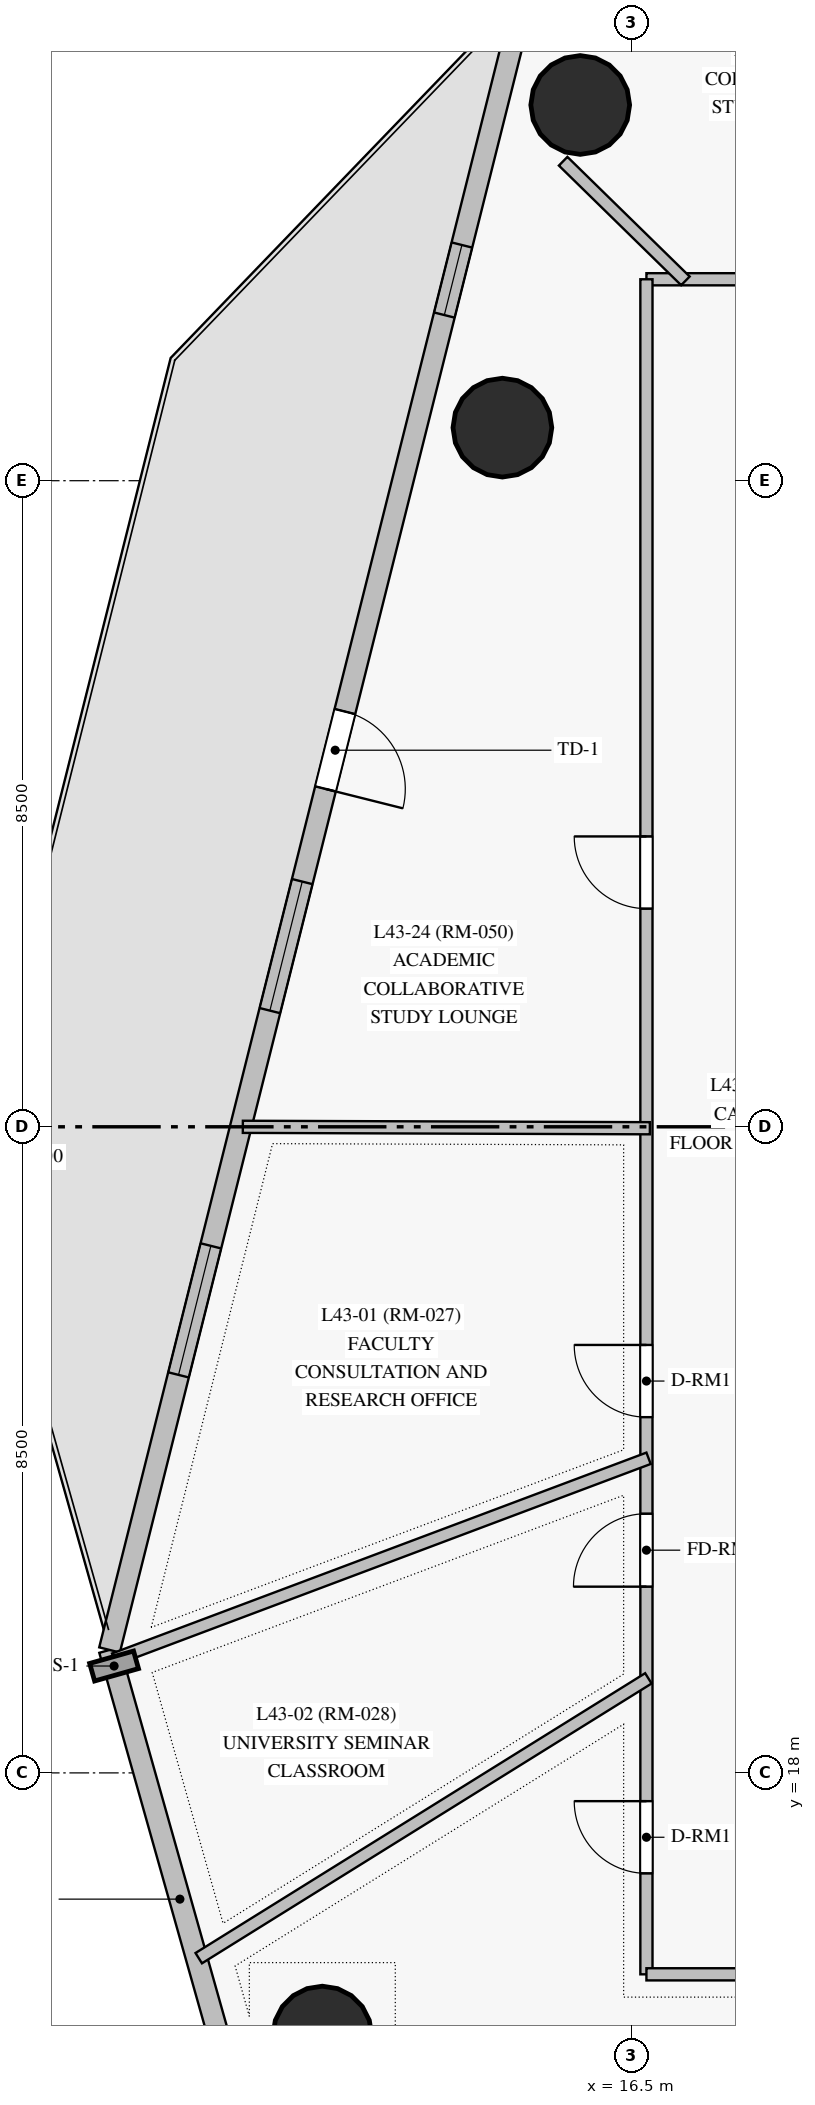
"""IFC4 building model, lengths in metres.
Left out: names, types, materials, properties, quantities, classifications, styles, units other than length and angle.
Written with IfcOpenShell. Run it as: python <this file> out.ifc"""

import sys

from ifc_helpers import new_model, si_unit, direction, frame, frame_2d, origin, origin_with_axes, origin_2d, place, context, subcontext, project, spatial, rectangle, circle, extrude, source, transform, mapped, element, fill, save


model = new_model("IFC4")
c1 = context("Model", 3, precision=1e-05, world=origin(), true_north=direction((0.0, 1.0)))
c2 = subcontext(c1, "Body", "Model", "MODEL_VIEW")
j1 = project(units=[si_unit("LENGTHUNIT", "METRE"), si_unit("PLANEANGLEUNIT", "RADIAN")], contexts=[c1])
p1 = place(None, origin())
s1 = spatial("IfcSite", under=j1, at=p1, CompositionType="ELEMENT")
p2 = place(p1, origin())
s2 = spatial("IfcBuilding", under=s1, at=p2, CompositionType="ELEMENT")
p3 = place(p2, frame((0.0, 0.0, 152.55)))
s3 = spatial("IfcBuildingStorey", under=s2, at=p3, CompositionType="ELEMENT", Elevation=152.55)
m1 = source(origin_with_axes(), c2, "Body", "SweptSolid", [
    extrude(circle(Radius=0.65, at=origin_2d()), origin(), (0.0, 0.0, 1.0), 4.0),
])
for number, where, z_axis, x_axis in (
    (1, (15.829, 39.943, 0.0), (0.0, 0.0, 1.0), (1.0, 0.0, 0.0)),
    (2, (14.805, 35.698, 0.0), (0.0, 0.0, 1.0), (1.0, 0.0, 0.0)),
    (3, (12.436, 14.544, 0.0), (0.0, 0.0, 1.0), (1.0, 0.0, 0.0)),
):
    element("IfcColumn", number, at=place(p3, frame(where, z_axis=z_axis, x_axis=x_axis)), inside=s3, PredefinedType="COLUMN", context=c2, shape_type="MappedRepresentation", body=[
        mapped(m1, transform((0.0, 0.0, 0.0), scale=1.0)),
    ])
p4 = place(p3, frame((9.637, 19.618, 0.0), z_axis=(0.0, 0.0, 1.0), x_axis=(0.271681437249, -0.96238723841, 0.0)))
e4 = element("IfcWall", 4, at=p4, inside=s3, PredefinedType="SOLIDWALL", context=c2, shape_type="SweptSolid", body=[
    extrude(rectangle(XDim=6.813, YDim=0.28, at=frame_2d((3.407, 0.0))), origin(), (0.0, 0.0, 1.0), 3.445),
])
p5 = place(p3, frame((15.117, 41.47, 0.0), z_axis=(0.0, 0.0, 1.0), x_axis=(-0.243272448764, -0.96995799686, 0.0)))
e5 = element("IfcWall", 5, at=p5, inside=s3, PredefinedType="SOLIDWALL", context=c2, shape_type="SweptSolid", body=[
    extrude(rectangle(XDim=22.529, YDim=0.28, at=frame_2d((11.265, 0.0))), origin(), (0.0, 0.0, 1.0), 3.445),
])
p6 = place(p5, frame((3.473, 0.0, 0.85)))
e6 = element("IfcOpeningElement", 6, at=p6, cuts=e5, PredefinedType="OPENING", context=c2, shape_type="SweptSolid", body=[
    extrude(rectangle(XDim=0.95, YDim=1.5, at=frame_2d((0.475, 0.75))), frame((0.0, 0.15, 0.0), z_axis=(0.0, -1.0, 0.0), x_axis=(1.0, 0.0, 0.0)), (0.0, 0.0, 1.0), 0.3),
])
p7 = place(p5, frame((12.108, 0.0, 0.85)))
e7 = element("IfcOpeningElement", 7, at=p7, cuts=e5, PredefinedType="OPENING", context=c2, shape_type="SweptSolid", body=[
    extrude(rectangle(XDim=1.75, YDim=1.65, at=frame_2d((0.875, 0.825))), frame((0.0, 0.15, 0.0), z_axis=(0.0, -1.0, 0.0), x_axis=(1.0, 0.0, 0.0)), (0.0, 0.0, 1.0), 0.3),
])
p8 = place(p5, frame((17.049, 0.0, 0.85)))
e8 = element("IfcOpeningElement", 8, at=p8, cuts=e5, PredefinedType="OPENING", context=c2, shape_type="SweptSolid", body=[
    extrude(rectangle(XDim=1.75, YDim=1.65, at=frame_2d((0.875, 0.825))), frame((0.0, 0.15, 0.0), z_axis=(0.0, -1.0, 0.0), x_axis=(1.0, 0.0, 0.0)), (0.0, 0.0, 1.0), 0.3),
])
p9 = place(p5, frame((9.801, 0.0, 0.0)))
e9 = element("IfcOpeningElement", 9, at=p9, cuts=e5, PredefinedType="OPENING", context=c2, shape_type="SweptSolid", body=[
    extrude(rectangle(XDim=1.05, YDim=2.12, at=frame_2d((0.525, 1.06))), frame((0.0, 0.15, 0.0), z_axis=(0.0, -1.0, 0.0), x_axis=(1.0, 0.0, 0.0)), (0.0, 0.0, 1.0), 0.3),
])
p10 = place(p3, frame((16.7, 37.65, 0.0), z_axis=(0.0, 0.0, 1.0), x_axis=(1.0, 0.0, 0.0)))
e10 = element("IfcWall", 10, at=p10, inside=s3, PredefinedType="PARTITIONING", context=c2, shape_type="SweptSolid", body=[
    extrude(rectangle(XDim=23.5, YDim=0.16, at=frame_2d((11.75, 0.0))), origin(), (0.0, 0.0, 1.0), 3.325),
])
p11 = place(p10, frame((21.331, 0.0, 0.0)))
e11 = element("IfcOpeningElement", 11, at=p11, cuts=e10, PredefinedType="OPENING", context=c2, shape_type="SweptSolid", body=[
    extrude(rectangle(XDim=0.95, YDim=2.15, at=frame_2d((0.475, 1.075))), frame((0.0, 0.09, 0.0), z_axis=(0.0, -1.0, 0.0), x_axis=(1.0, 0.0, 0.0)), (0.0, 0.0, 1.0), 0.18),
])
p12 = place(p10, frame((17.334, 0.0, 0.0)))
e12 = element("IfcOpeningElement", 12, at=p12, cuts=e10, PredefinedType="OPENING", context=c2, shape_type="SweptSolid", body=[
    extrude(rectangle(XDim=0.86, YDim=2.1, at=frame_2d((0.43, 1.05))), frame((0.0, 0.09, 0.0), z_axis=(0.0, -1.0, 0.0), x_axis=(1.0, 0.0, 0.0)), (0.0, 0.0, 1.0), 0.18),
])
p13 = place(p10, frame((15.16, 0.0, 0.0)))
e13 = element("IfcOpeningElement", 13, at=p13, cuts=e10, PredefinedType="OPENING", context=c2, shape_type="SweptSolid", body=[
    extrude(rectangle(XDim=0.95, YDim=2.15, at=frame_2d((0.475, 1.075))), frame((0.0, 0.09, 0.0), z_axis=(0.0, -1.0, 0.0), x_axis=(1.0, 0.0, 0.0)), (0.0, 0.0, 1.0), 0.18),
])
p14 = place(p10, frame((13.06, 0.0, 0.0)))
e14 = element("IfcOpeningElement", 14, at=p14, cuts=e10, PredefinedType="OPENING", context=c2, shape_type="SweptSolid", body=[
    extrude(rectangle(XDim=0.95, YDim=2.15, at=frame_2d((0.475, 1.075))), frame((0.0, 0.09, 0.0), z_axis=(0.0, -1.0, 0.0), x_axis=(1.0, 0.0, 0.0)), (0.0, 0.0, 1.0), 0.18),
])
p15 = place(p10, frame((10.973, 0.0, 0.0)))
e15 = element("IfcOpeningElement", 15, at=p15, cuts=e10, PredefinedType="OPENING", context=c2, shape_type="SweptSolid", body=[
    extrude(rectangle(XDim=0.95, YDim=2.15, at=frame_2d((0.475, 1.075))), frame((0.0, 0.09, 0.0), z_axis=(0.0, -1.0, 0.0), x_axis=(1.0, 0.0, 0.0)), (0.0, 0.0, 1.0), 0.18),
])
p16 = place(p10, frame((8.885, 0.0, 0.0)))
e16 = element("IfcOpeningElement", 16, at=p16, cuts=e10, PredefinedType="OPENING", context=c2, shape_type="SweptSolid", body=[
    extrude(rectangle(XDim=0.95, YDim=2.15, at=frame_2d((0.475, 1.075))), frame((0.0, 0.09, 0.0), z_axis=(0.0, -1.0, 0.0), x_axis=(1.0, 0.0, 0.0)), (0.0, 0.0, 1.0), 0.18),
])
p17 = place(p10, frame((6.61, 0.0, 0.0)))
e17 = element("IfcOpeningElement", 17, at=p17, cuts=e10, PredefinedType="OPENING", context=c2, shape_type="SweptSolid", body=[
    extrude(rectangle(XDim=0.95, YDim=2.15, at=frame_2d((0.475, 1.075))), frame((0.0, 0.09, 0.0), z_axis=(0.0, -1.0, 0.0), x_axis=(1.0, 0.0, 0.0)), (0.0, 0.0, 1.0), 0.18),
])
p18 = place(p10, frame((4.21, 0.0, 0.0)))
e18 = element("IfcOpeningElement", 18, at=p18, cuts=e10, PredefinedType="OPENING", context=c2, shape_type="SweptSolid", body=[
    extrude(rectangle(XDim=0.95, YDim=2.15, at=frame_2d((0.475, 1.075))), frame((0.0, 0.09, 0.0), z_axis=(0.0, -1.0, 0.0), x_axis=(1.0, 0.0, 0.0)), (0.0, 0.0, 1.0), 0.18),
])
p19 = place(p10, frame((2.482, 0.0, 0.0)))
e19 = element("IfcOpeningElement", 19, at=p19, cuts=e10, PredefinedType="OPENING", context=c2, shape_type="SweptSolid", body=[
    extrude(rectangle(XDim=0.95, YDim=2.15, at=frame_2d((0.475, 1.075))), frame((0.0, 0.09, 0.0), z_axis=(0.0, -1.0, 0.0), x_axis=(1.0, 0.0, 0.0)), (0.0, 0.0, 1.0), 0.18),
])
p20 = place(p3, frame((16.7, 15.35, 0.0), z_axis=(0.0, 0.0, 1.0), x_axis=(0.0, 1.0, 0.0)))
e20 = element("IfcWall", 20, at=p20, inside=s3, PredefinedType="PARTITIONING", context=c2, shape_type="SweptSolid", body=[
    extrude(rectangle(XDim=22.3, YDim=0.16, at=frame_2d((11.15, 0.0))), origin(), (0.0, 0.0, 1.0), 2.975),
])
p21 = place(p20, frame((7.33, 0.0, 0.0)))
e21 = element("IfcOpeningElement", 21, at=p21, cuts=e20, PredefinedType="OPENING", context=c2, shape_type="SweptSolid", body=[
    extrude(rectangle(XDim=0.95, YDim=2.15, at=frame_2d((0.475, 1.075))), frame((0.0, 0.09, 0.0), z_axis=(0.0, -1.0, 0.0), x_axis=(1.0, 0.0, 0.0)), (0.0, 0.0, 1.0), 0.18),
])
p22 = place(p20, frame((5.1, 0.0, 0.0)))
e22 = element("IfcOpeningElement", 22, at=p22, cuts=e20, PredefinedType="OPENING", context=c2, shape_type="SweptSolid", body=[
    extrude(rectangle(XDim=0.96, YDim=2.15, at=frame_2d((0.48, 1.075))), frame((0.0, 0.09, 0.0), z_axis=(0.0, -1.0, 0.0), x_axis=(1.0, 0.0, 0.0)), (0.0, 0.0, 1.0), 0.18),
])
p23 = place(p20, frame((1.328, 0.0, 0.0)))
e23 = element("IfcOpeningElement", 23, at=p23, cuts=e20, PredefinedType="OPENING", context=c2, shape_type="SweptSolid", body=[
    extrude(rectangle(XDim=0.95, YDim=2.15, at=frame_2d((0.475, 1.075))), frame((0.0, 0.09, 0.0), z_axis=(0.0, -1.0, 0.0), x_axis=(1.0, 0.0, 0.0)), (0.0, 0.0, 1.0), 0.18),
])
p24 = place(p20, frame((14.02, 0.0, 0.0)))
e24 = element("IfcOpeningElement", 24, at=p24, cuts=e20, PredefinedType="OPENING", context=c2, shape_type="SweptSolid", body=[
    extrude(rectangle(XDim=0.95, YDim=2.15, at=frame_2d((0.475, 1.075))), frame((0.0, 0.09, 0.0), z_axis=(0.0, -1.0, 0.0), x_axis=(1.0, 0.0, 0.0)), (0.0, 0.0, 1.0), 0.18),
])
p25 = place(p3, frame((27.55, 15.35, 0.0), z_axis=(0.0, 0.0, 1.0), x_axis=(-1.0, 0.0, 0.0)))
e25 = element("IfcWall", 25, at=p25, inside=s3, PredefinedType="PARTITIONING", context=c2, shape_type="SweptSolid", body=[
    extrude(rectangle(XDim=10.85, YDim=0.16, at=frame_2d((5.425, 0.0))), origin(), (0.0, 0.0, 1.0), 3.325),
])
p26 = place(p25, frame((5.29, 0.0, 0.0)))
e26 = element("IfcOpeningElement", 26, at=p26, cuts=e25, PredefinedType="OPENING", context=c2, shape_type="SweptSolid", body=[
    extrude(rectangle(XDim=0.95, YDim=2.15, at=frame_2d((0.475, 1.075))), frame((0.0, 0.09, 0.0), z_axis=(0.0, -1.0, 0.0), x_axis=(1.0, 0.0, 0.0)), (0.0, 0.0, 1.0), 0.18),
])
p27 = place(p25, frame((3.323, 0.0, 0.0)))
e27 = element("IfcOpeningElement", 27, at=p27, cuts=e25, PredefinedType="OPENING", context=c2, shape_type="SweptSolid", body=[
    extrude(rectangle(XDim=0.95, YDim=2.15, at=frame_2d((0.475, 1.075))), frame((0.0, 0.09, 0.0), z_axis=(0.0, -1.0, 0.0), x_axis=(1.0, 0.0, 0.0)), (0.0, 0.0, 1.0), 0.18),
])
p28 = place(p3, frame((22.771, 15.377, 0.0), z_axis=(0.0, 0.0, 1.0), x_axis=(-0.453637892893, -0.891186098484, 0.0)))
e28 = element("IfcWall", 28, at=p28, inside=s3, PredefinedType="PARTITIONING", context=c2, shape_type="SweptSolid", body=[
    extrude(rectangle(XDim=10.698, YDim=0.16, at=frame_2d((5.349, 0.0))), origin(), (0.0, 0.0, 1.0), 3.775),
])
p29 = place(p3, frame((16.728, 22.139, 0.0), z_axis=(0.0, 0.0, 1.0), x_axis=(-0.936043012374, -0.351885604971, 0.0)))
e29 = element("IfcWall", 29, at=p29, inside=s3, PredefinedType="PARTITIONING", context=c2, shape_type="SweptSolid", body=[
    extrude(rectangle(XDim=7.511, YDim=0.16, at=frame_2d((3.756, 0.0))), origin(), (0.0, 0.0, 1.0), 3.775),
])
p30 = place(p3, frame((19.085, 15.373, 0.0), z_axis=(0.0, 0.0, 1.0), x_axis=(-0.642788640308, -0.766043578324, 0.0)))
e30 = element("IfcWall", 30, at=p30, inside=s3, PredefinedType="PARTITIONING", context=c2, shape_type="SweptSolid", body=[
    extrude(rectangle(XDim=7.339, YDim=0.16, at=frame_2d((3.669, 0.0))), origin(), (0.0, 0.0, 1.0), 2.975),
])
p31 = place(p3, frame((16.726, 19.243, 0.0), z_axis=(0.0, 0.0, 1.0), x_axis=(-0.849038090378, -0.528331639301, 0.0)))
e31 = element("IfcWall", 31, at=p31, inside=s3, PredefinedType="PARTITIONING", context=c2, shape_type="SweptSolid", body=[
    extrude(rectangle(XDim=6.967, YDim=0.16, at=frame_2d((3.483, 0.0))), origin(), (0.0, 0.0, 1.0), 3.775),
])
p32 = place(p3, frame((11.39, 26.5, 0.0), z_axis=(0.0, 0.0, 1.0), x_axis=(0.999993837579, -0.003510670017, 0.0)))
e32 = element("IfcWall", 32, at=p32, inside=s3, PredefinedType="PARTITIONING", context=c2, shape_type="SweptSolid", body=[
    extrude(rectangle(XDim=5.355, YDim=0.16, at=frame_2d((2.677, 0.0))), origin(), (0.0, 0.0, 1.0), 3.775),
])
p33 = place(p3, frame((17.213, 37.629, 0.0), z_axis=(0.0, 0.0, 1.0), x_axis=(-0.71471376476, 0.699417067609, 0.0)))
e33 = element("IfcWall", 33, at=p33, inside=s3, PredefinedType="PARTITIONING", context=c2, shape_type="SweptSolid", body=[
    extrude(rectangle(XDim=2.25, YDim=0.16, at=frame_2d((1.125, 0.0))), origin(), (0.0, 0.0, 1.0), 2.975),
])
m2 = source(origin_with_axes(), c2, "Body", "SweptSolid", [
    extrude(rectangle(XDim=0.95, YDim=1.5, at=frame_2d((0.475, 0.75))), frame((0.0, 0.03, 0.0), z_axis=(0.0, -1.0, 0.0), x_axis=(1.0, 0.0, 0.0)), (0.0, 0.0, 1.0), 0.06),
])
p34 = place(p6, origin())
e34 = element("IfcWindow", 34, at=p34, inside=s3, PartitioningType="SINGLE_PANEL", PredefinedType="WINDOW", context=c2, shape_type="MappedRepresentation", body=[
    mapped(m2, transform((0.0, 0.0, 0.0), scale=1.0)),
])
fill(e6, e34)
m3 = source(origin_with_axes(), c2, "Body", "SweptSolid", [
    extrude(rectangle(XDim=1.75, YDim=1.65, at=frame_2d((0.875, 0.825))), frame((0.0, 0.03, 0.0), z_axis=(0.0, -1.0, 0.0), x_axis=(1.0, 0.0, 0.0)), (0.0, 0.0, 1.0), 0.06),
])
p35 = place(p7, origin())
e35 = element("IfcWindow", 35, at=p35, inside=s3, PartitioningType="SINGLE_PANEL", PredefinedType="WINDOW", context=c2, shape_type="MappedRepresentation", body=[
    mapped(m3, transform((0.0, 0.0, 0.0), scale=1.0)),
])
fill(e7, e35)
p36 = place(p8, origin())
e36 = element("IfcWindow", 36, at=p36, inside=s3, PartitioningType="SINGLE_PANEL", PredefinedType="WINDOW", context=c2, shape_type="MappedRepresentation", body=[
    mapped(m3, transform((0.0, 0.0, 0.0), scale=1.0)),
])
fill(e8, e36)
m4 = source(origin_with_axes(), c2, "Body", "SweptSolid", [
    extrude(rectangle(XDim=1.05, YDim=2.12, at=frame_2d((0.525, 1.06))), frame((0.0, 0.025, 0.0), z_axis=(0.0, -1.0, 0.0), x_axis=(1.0, 0.0, 0.0)), (0.0, 0.0, 1.0), 0.05),
])
p37 = place(p9, origin())
e37 = element("IfcDoor", 37, at=p37, inside=s3, OperationType="SINGLE_SWING_RIGHT", PredefinedType="DOOR", context=c2, shape_type="MappedRepresentation", body=[
    mapped(m4, transform((0.0, 0.0, 0.0), scale=1.0)),
])
fill(e9, e37)
m5 = source(origin_with_axes(), c2, "Body", "SweptSolid", [
    extrude(rectangle(XDim=0.95, YDim=2.15, at=frame_2d((0.475, 1.075))), frame((0.0, 0.025, 0.0), z_axis=(0.0, -1.0, 0.0), x_axis=(1.0, 0.0, 0.0)), (0.0, 0.0, 1.0), 0.05),
])
p38 = place(p21, origin())
e38 = element("IfcDoor", 38, at=p38, inside=s3, OperationType="SINGLE_SWING_RIGHT", PredefinedType="DOOR", context=c2, shape_type="MappedRepresentation", body=[
    mapped(m5, transform((0.0, 0.0, 0.0), scale=1.0)),
])
fill(e21, e38)
m6 = source(origin_with_axes(), c2, "Body", "SweptSolid", [
    extrude(rectangle(XDim=0.96, YDim=2.15, at=frame_2d((0.48, 1.075))), frame((0.0, 0.025, 0.0), z_axis=(0.0, -1.0, 0.0), x_axis=(1.0, 0.0, 0.0)), (0.0, 0.0, 1.0), 0.05),
])
p39 = place(p22, origin())
e39 = element("IfcDoor", 39, at=p39, inside=s3, OperationType="SINGLE_SWING_LEFT", PredefinedType="DOOR", context=c2, shape_type="MappedRepresentation", body=[
    mapped(m6, transform((0.0, 0.0, 0.0), scale=1.0)),
])
fill(e22, e39)
p40 = place(p23, origin())
e40 = element("IfcDoor", 40, at=p40, inside=s3, OperationType="SINGLE_SWING_RIGHT", PredefinedType="DOOR", context=c2, shape_type="MappedRepresentation", body=[
    mapped(m5, transform((0.0, 0.0, 0.0), scale=1.0)),
])
fill(e23, e40)
p41 = place(p24, origin())
e41 = element("IfcDoor", 41, at=p41, inside=s3, OperationType="SINGLE_SWING_RIGHT", PredefinedType="DOOR", context=c2, shape_type="MappedRepresentation", body=[
    mapped(m5, transform((0.0, 0.0, 0.0), scale=1.0)),
])
fill(e24, e41)
save(model, sys.argv[1])
